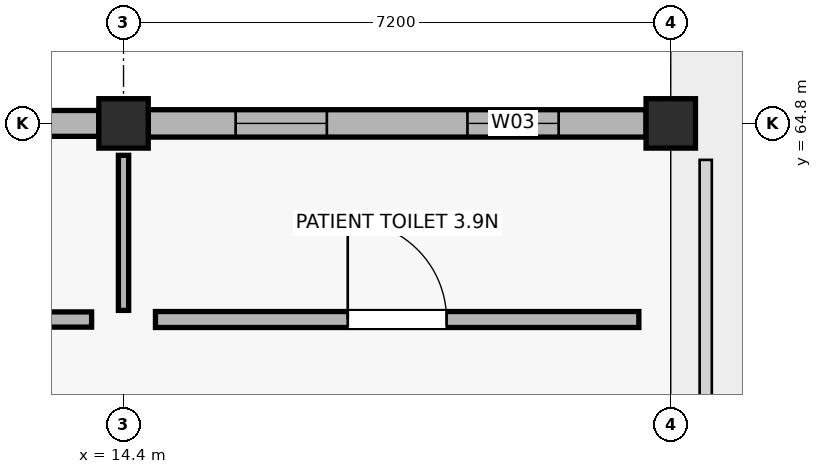
"""IFC4 building model, lengths in metres.
Left out: names, types, materials, properties, quantities, classifications, styles, units other than length and angle.
Written with IfcOpenShell. Run it as: python <this file> out.ifc"""

import sys

from ifc_helpers import new_model, si_unit, direction, frame, frame_2d, origin, origin_2d, place, context, subcontext, project, spatial, rectangle, circle, extrude, element, fill, save


model = new_model("IFC4")
c1 = context("Model", 3, precision=1e-05, world=origin(), true_north=direction((0.0, 1.0)))
c2 = subcontext(c1, "Body", "Model", "MODEL_VIEW")
j1 = project(units=[si_unit("LENGTHUNIT", "METRE"), si_unit("PLANEANGLEUNIT", "RADIAN")], contexts=[c1])
p1 = place(None, origin())
s1 = spatial("IfcSite", under=j1, at=p1, CompositionType="ELEMENT")
p2 = place(p1, origin())
s2 = spatial("IfcBuilding", under=s1, at=p2, CompositionType="ELEMENT")
p3 = place(p2, origin())
s3 = spatial("IfcBuildingStorey", under=s2, at=p3, CompositionType="ELEMENT", Elevation=0.0)
p4 = place(p3, frame((14.4, 64.8, -0.25), z_axis=(0.0, 0.0, 1.0), x_axis=(1.0, 0.0, 0.0)))
e1 = element("IfcColumn", 1, at=p4, inside=s3, PredefinedType="COLUMN", context=c2, shape_type="SweptSolid", body=[
    extrude(rectangle(XDim=0.65, YDim=0.65, at=origin_2d()), origin(), (0.0, 0.0, 1.0), 4.75),
])
p5 = place(p3, frame((21.6, 64.8, -0.25), z_axis=(0.0, 0.0, 1.0), x_axis=(1.0, 0.0, 0.0)))
e2 = element("IfcColumn", 2, at=p5, inside=s3, PredefinedType="COLUMN", context=c2, shape_type="SweptSolid", body=[
    extrude(circle(Radius=0.325, at=origin_2d()), origin(), (0.0, 0.0, 1.0), 4.75),
])
p6 = place(p3, frame((14.075, 64.8, 0.0), z_axis=(0.0, 0.0, 1.0), x_axis=(-1.0, 0.0, 0.0)))
e3 = element("IfcWall", 3, at=p6, inside=s3, PredefinedType="SOLIDWALL", context=c2, shape_type="SweptSolid", body=[
    extrude(rectangle(XDim=6.525, YDim=0.34, at=frame_2d((3.262, 0.0))), origin(), (0.0, 0.0, 1.0), 3.47),
])
p7 = place(p6, frame((1.3, 0.0, 0.9)))
e4 = element("IfcOpeningElement", 4, at=p7, cuts=e3, PredefinedType="OPENING", context=c2, shape_type="SweptSolid", body=[
    extrude(rectangle(XDim=0.9, YDim=1.88, at=frame_2d((0.45, 0.94))), frame((0.0, 0.18, 0.0), z_axis=(0.0, -1.0, 0.0), x_axis=(1.0, 0.0, 0.0)), (0.0, 0.0, 1.0), 0.36),
])
p8 = place(p6, frame((4.325, 0.0, 0.9)))
e5 = element("IfcOpeningElement", 5, at=p8, cuts=e3, PredefinedType="OPENING", context=c2, shape_type="SweptSolid", body=[
    extrude(rectangle(XDim=0.9, YDim=1.88, at=frame_2d((0.45, 0.94))), frame((0.0, 0.18, 0.0), z_axis=(0.0, -1.0, 0.0), x_axis=(1.0, 0.0, 0.0)), (0.0, 0.0, 1.0), 0.36),
])
p9 = place(p3, frame((21.275, 64.8, 0.0), z_axis=(0.0, 0.0, 1.0), x_axis=(-1.0, 0.0, 0.0)))
e6 = element("IfcWall", 6, at=p9, inside=s3, PredefinedType="SOLIDWALL", context=c2, shape_type="SweptSolid", body=[
    extrude(rectangle(XDim=6.55, YDim=0.36, at=frame_2d((3.275, 0.0))), origin(), (0.0, 0.0, 1.0), 3.47),
])
p10 = place(p9, frame((1.15, 0.0, 0.9)))
e7 = element("IfcOpeningElement", 7, at=p10, cuts=e6, PredefinedType="OPENING", context=c2, shape_type="SweptSolid", body=[
    extrude(rectangle(XDim=1.2, YDim=1.25, at=frame_2d((0.6, 0.625))), frame((0.0, 0.19, 0.0), z_axis=(0.0, -1.0, 0.0), x_axis=(1.0, 0.0, 0.0)), (0.0, 0.0, 1.0), 0.38),
])
p11 = place(p9, frame((4.2, 0.0, 0.9)))
e8 = element("IfcOpeningElement", 8, at=p11, cuts=e6, PredefinedType="OPENING", context=c2, shape_type="SweptSolid", body=[
    extrude(rectangle(XDim=1.2, YDim=1.25, at=frame_2d((0.6, 0.625))), frame((0.0, 0.19, 0.0), z_axis=(0.0, -1.0, 0.0), x_axis=(1.0, 0.0, 0.0)), (0.0, 0.0, 1.0), 0.38),
])
p12 = place(p3, frame((7.62, 62.22, 0.0), z_axis=(0.0, 0.0, 1.0), x_axis=(1.0, 0.0, 0.0)))
e9 = element("IfcWall", 9, at=p12, inside=s3, PredefinedType="SOLIDWALL", context=c2, shape_type="SweptSolid", body=[
    extrude(rectangle(XDim=6.36, YDim=0.2, at=frame_2d((3.18, 0.0))), origin(), (0.0, 0.0, 1.0), 3.36),
])
p13 = place(p12, frame((2.65, 0.0, 0.0)))
e10 = element("IfcOpeningElement", 10, at=p13, cuts=e9, PredefinedType="OPENING", context=c2, shape_type="SweptSolid", body=[
    extrude(rectangle(XDim=1.06, YDim=2.09, at=frame_2d((0.53, 1.045))), frame((0.0, 0.11, 0.0), z_axis=(0.0, -1.0, 0.0), x_axis=(1.0, 0.0, 0.0)), (0.0, 0.0, 1.0), 0.22),
])
p14 = place(p3, frame((14.4, 62.34, 0.0), z_axis=(0.0, 0.0, 1.0), x_axis=(0.0, 1.0, 0.0)))
e11 = element("IfcWall", 11, at=p14, inside=s3, PredefinedType="PARTITIONING", context=c2, shape_type="SweptSolid", body=[
    extrude(rectangle(XDim=2.04, YDim=0.135, at=frame_2d((1.02, 0.0))), origin(), (0.0, 0.0, 1.0), 3.36),
])
p15 = place(p3, frame((14.82, 62.22, 0.0), z_axis=(0.0, 0.0, 1.0), x_axis=(1.0, 0.0, 0.0)))
e12 = element("IfcWall", 12, at=p15, inside=s3, PredefinedType="PLUMBINGWALL", context=c2, shape_type="SweptSolid", body=[
    extrude(rectangle(XDim=6.36, YDim=0.21, at=frame_2d((3.18, 0.0))), origin(), (0.0, 0.0, 1.0), 3.36),
])
p16 = place(p15, frame((2.53, 0.0, 0.0)))
e13 = element("IfcOpeningElement", 13, at=p16, cuts=e12, PredefinedType="OPENING", context=c2, shape_type="SweptSolid", body=[
    extrude(rectangle(XDim=1.3, YDim=2.09, at=frame_2d((0.65, 1.045))), frame((0.0, 0.115, 0.0), z_axis=(0.0, -1.0, 0.0), x_axis=(1.0, 0.0, 0.0)), (0.0, 0.0, 1.0), 0.23),
])
p17 = place(p10, origin())
e14 = element("IfcWindow", 14, at=p17, inside=s3, PartitioningType="SINGLE_PANEL", PredefinedType="WINDOW", context=c2, shape_type="SweptSolid", body=[
    extrude(rectangle(XDim=1.2, YDim=1.25, at=frame_2d((0.6, 0.625))), frame((0.0, 0.03, 0.0), z_axis=(0.0, -1.0, 0.0), x_axis=(1.0, 0.0, 0.0)), (0.0, 0.0, 1.0), 0.06),
])
fill(e7, e14)
p18 = place(p11, origin())
e15 = element("IfcWindow", 15, at=p18, inside=s3, PartitioningType="SINGLE_PANEL", PredefinedType="WINDOW", context=c2, shape_type="SweptSolid", body=[
    extrude(rectangle(XDim=1.2, YDim=1.25, at=frame_2d((0.6, 0.625))), frame((0.0, 0.03, 0.0), z_axis=(0.0, -1.0, 0.0), x_axis=(1.0, 0.0, 0.0)), (0.0, 0.0, 1.0), 0.06),
])
fill(e8, e15)
p19 = place(p16, origin())
e16 = element("IfcDoor", 16, at=p19, inside=s3, OperationType="SINGLE_SWING_LEFT", PredefinedType="DOOR", context=c2, shape_type="SweptSolid", body=[
    extrude(rectangle(XDim=1.3, YDim=2.09, at=frame_2d((0.65, 1.045))), frame((0.0, 0.025, 0.0), z_axis=(0.0, -1.0, 0.0), x_axis=(1.0, 0.0, 0.0)), (0.0, 0.0, 1.0), 0.05),
])
fill(e13, e16)
save(model, sys.argv[1])
